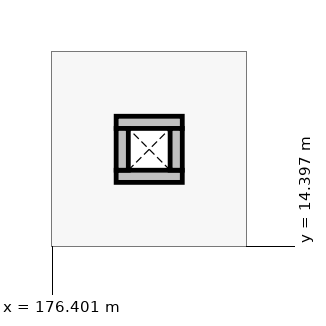
"""IFC4 building model, lengths in metres.
Left out: names, types, materials, properties, quantities, classifications, styles, units other than length and angle.
Written with IfcOpenShell. Run it as: python <this file> out.ifc"""

import sys

from ifc_helpers import new_model, si_unit, direction, frame, frame_2d, origin, place, context, subcontext, project, spatial, rectangle, extrude, element, save


model = new_model("IFC4")
c1 = context("Model", 3, precision=1e-05, world=origin(), true_north=direction((0.0, 1.0)))
c2 = subcontext(c1, "Body", "Model", "MODEL_VIEW")
j1 = project(units=[si_unit("LENGTHUNIT", "METRE"), si_unit("PLANEANGLEUNIT", "RADIAN")], contexts=[c1])
p1 = place(None, origin())
s1 = spatial("IfcSite", under=j1, at=p1, CompositionType="ELEMENT")
p2 = place(p1, origin())
s2 = spatial("IfcBuilding", under=s1, at=p2, CompositionType="ELEMENT")
p3 = place(p2, frame((0.0, 0.0, 4.8)))
s3 = spatial("IfcBuildingStorey", under=s2, at=p3, CompositionType="ELEMENT", Elevation=4.8)
for number, where, z_axis, x_axis in (
    (1, (177.24, 15.32, 0.0), (0.0, 0.0, 1.0), (1.0, 0.0, 0.0)),
    (2, (177.24, 16.03, 0.0), (0.0, 0.0, 1.0), (1.0, 0.0, 0.0)),
):
    element("IfcWall", number, at=place(p3, frame(where, z_axis=z_axis, x_axis=x_axis)), inside=s3, PredefinedType="PARTITIONING", context=c2, shape_type="SweptSolid", body=[
        extrude(rectangle(XDim=0.87, YDim=0.16, at=frame_2d((0.435, 0.0))), origin(), (0.0, 0.0, 1.0), 3.35),
    ])
for number, where, z_axis, x_axis in (
    (3, (177.32, 15.4, 0.0), (0.0, 0.0, 1.0), (0.0, 1.0, 0.0)),
    (4, (178.03, 15.4, 0.0), (0.0, 0.0, 1.0), (0.0, 1.0, 0.0)),
):
    element("IfcWall", number, at=place(p3, frame(where, z_axis=z_axis, x_axis=x_axis)), inside=s3, PredefinedType="PARTITIONING", context=c2, shape_type="SweptSolid", body=[
        extrude(rectangle(XDim=0.55, YDim=0.16, at=frame_2d((0.275, 0.0))), origin(), (0.0, 0.0, 1.0), 3.35),
    ])
save(model, sys.argv[1])
